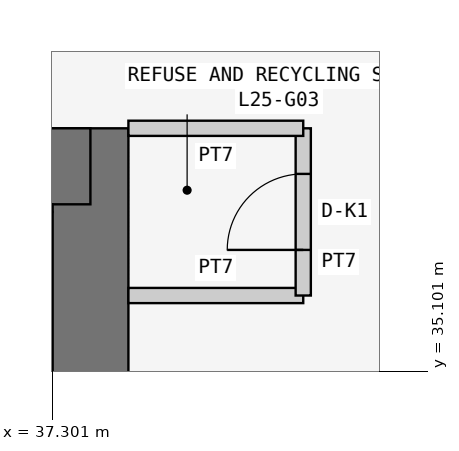
"""IFC4 building model, lengths in metres.
Left out: names, types, materials, properties, quantities, classifications, styles, units other than length and angle.
Written with IfcOpenShell. Run it as: python <this file> out.ifc"""

import sys

from ifc_helpers import new_model, si_unit, direction, frame, frame_2d, origin, place, context, subcontext, project, spatial, rectangle, extrude, element, fill, save


model = new_model("IFC4")
c1 = context("Model", 3, precision=1e-05, world=origin(), true_north=direction((0.0, 1.0)))
c2 = subcontext(c1, "Body", "Model", "MODEL_VIEW")
j1 = project(units=[si_unit("LENGTHUNIT", "METRE"), si_unit("PLANEANGLEUNIT", "RADIAN")], contexts=[c1])
p1 = place(None, origin())
s1 = spatial("IfcSite", under=j1, at=p1, CompositionType="ELEMENT")
p2 = place(p1, origin())
s2 = spatial("IfcBuilding", under=s1, at=p2, CompositionType="ELEMENT")
p3 = place(p2, frame((0.0, 0.0, 99.3)))
s3 = spatial("IfcBuildingStorey", under=s2, at=p3, CompositionType="ELEMENT", Elevation=99.3)
p4 = place(p3, frame((37.8, 21.0, 0.0), z_axis=(0.0, 0.0, 1.0), x_axis=(0.0, 1.0, 0.0)))
e1 = element("IfcWall", 1, at=p4, inside=s3, PredefinedType="SHEAR", context=c2, shape_type="SweptSolid", body=[
    extrude(rectangle(XDim=17.3, YDim=1.0, at=frame_2d((8.65, 0.0))), origin(), (0.0, 0.0, 1.0), 3.6),
])
p5 = place(p4, frame((5.2, 0.0, 0.0)))
e2 = element("IfcOpeningElement", 2, at=p5, cuts=e1, PredefinedType="OPENING", context=c2, shape_type="SweptSolid", body=[
    extrude(rectangle(XDim=1.2, YDim=2.1, at=frame_2d((0.6, 1.05))), frame((0.0, 0.51, 0.0), z_axis=(0.0, -1.0, 0.0), x_axis=(1.0, 0.0, 0.0)), (0.0, 0.0, 1.0), 1.02),
])
p6 = place(p3, frame((37.8, 37.8, 0.0), z_axis=(0.0, 0.0, 1.0), x_axis=(-1.0, 0.0, 0.0)))
e3 = element("IfcWall", 3, at=p6, inside=s3, PredefinedType="SHEAR", context=c2, shape_type="SweptSolid", body=[
    extrude(rectangle(XDim=17.3, YDim=1.0, at=frame_2d((8.65, 0.0))), origin(), (0.0, 0.0, 1.0), 3.6),
])
p7 = place(p3, frame((38.3, 36.1, 0.0), z_axis=(0.0, 0.0, 1.0), x_axis=(1.0, 0.0, 0.0)))
e4 = element("IfcWall", 4, at=p7, inside=s3, PredefinedType="PARTITIONING", context=c2, shape_type="SweptSolid", body=[
    extrude(rectangle(XDim=2.3, YDim=0.2, at=frame_2d((1.15, 0.0))), origin(), (0.0, 0.0, 1.0), 3.35),
])
p8 = place(p3, frame((40.6, 36.1, 0.0), z_axis=(0.0, 0.0, 1.0), x_axis=(0.0, 1.0, 0.0)))
e5 = element("IfcWall", 5, at=p8, inside=s3, PredefinedType="PARTITIONING", context=c2, shape_type="SweptSolid", body=[
    extrude(rectangle(XDim=2.2, YDim=0.2, at=frame_2d((1.1, 0.0))), origin(), (0.0, 0.0, 1.0), 3.35),
])
p9 = place(p8, frame((0.6, 0.0, 0.0)))
e6 = element("IfcOpeningElement", 6, at=p9, cuts=e5, PredefinedType="OPENING", context=c2, shape_type="SweptSolid", body=[
    extrude(rectangle(XDim=1.0, YDim=2.1, at=frame_2d((0.5, 1.05))), frame((0.0, 0.11, 0.0), z_axis=(0.0, -1.0, 0.0), x_axis=(1.0, 0.0, 0.0)), (0.0, 0.0, 1.0), 0.22),
])
p10 = place(p3, frame((40.6, 38.3, 0.0), z_axis=(0.0, 0.0, 1.0), x_axis=(-1.0, 0.0, 0.0)))
e7 = element("IfcWall", 7, at=p10, inside=s3, PredefinedType="PARTITIONING", context=c2, shape_type="SweptSolid", body=[
    extrude(rectangle(XDim=2.3, YDim=0.2, at=frame_2d((1.15, 0.0))), origin(), (0.0, 0.0, 1.0), 3.35),
])
p11 = place(p9, origin())
e8 = element("IfcDoor", 8, at=p11, inside=s3, OperationType="SINGLE_SWING_LEFT", PredefinedType="DOOR", context=c2, shape_type="SweptSolid", body=[
    extrude(rectangle(XDim=1.0, YDim=2.1, at=frame_2d((0.5, 1.05))), frame((0.0, 0.025, 0.0), z_axis=(0.0, -1.0, 0.0), x_axis=(1.0, 0.0, 0.0)), (0.0, 0.0, 1.0), 0.05),
])
fill(e6, e8)
save(model, sys.argv[1])
